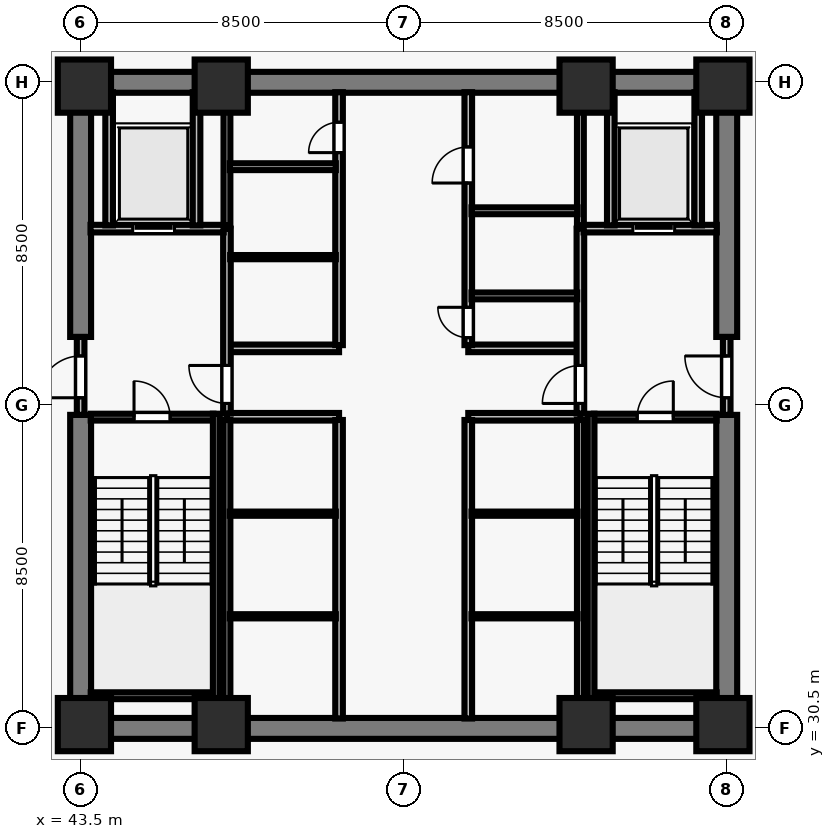
"""IFC4 building model, lengths in metres.
Left out: names, types, materials, properties, quantities, classifications, styles, units other than length and angle.
Written with IfcOpenShell. Run it as: python <this file> out.ifc"""

import sys

from ifc_helpers import new_model, si_unit, direction, frame, frame_2d, origin, origin_2d, place, context, subcontext, project, spatial, rectangle, extrude, element, fill, save


model = new_model("IFC4")
c1 = context("Model", 3, precision=1e-05, world=origin(), true_north=direction((0.0, 1.0)))
c2 = subcontext(c1, "Body", "Model", "MODEL_VIEW")
j1 = project(units=[si_unit("LENGTHUNIT", "METRE"), si_unit("PLANEANGLEUNIT", "RADIAN")], contexts=[c1])
p1 = place(None, origin())
s1 = spatial("IfcSite", under=j1, at=p1, CompositionType="ELEMENT")
p2 = place(p1, origin())
s2 = spatial("IfcBuilding", under=s1, at=p2, CompositionType="ELEMENT")
p3 = place(p2, frame((0.0, 0.0, -8.0)))
s3 = spatial("IfcBuildingStorey", under=s2, at=p3, CompositionType="ELEMENT", Elevation=-8.0)
for number, where, z_axis, x_axis in (
    (1, (43.6, 30.6, 0.0), (0.0, 0.0, 1.0), (1.0, 0.0, 0.0)),
    (2, (47.2, 30.6, 0.0), (0.0, 0.0, 1.0), (1.0, 0.0, 0.0)),
    (3, (56.8, 30.6, 0.0), (0.0, 0.0, 1.0), (1.0, 0.0, 0.0)),
    (4, (60.4, 30.6, 0.0), (0.0, 0.0, 1.0), (1.0, 0.0, 0.0)),
    (5, (43.6, 47.4, 0.0), (0.0, 0.0, 1.0), (1.0, 0.0, 0.0)),
    (6, (47.2, 47.4, 0.0), (0.0, 0.0, 1.0), (1.0, 0.0, 0.0)),
    (7, (56.8, 47.4, 0.0), (0.0, 0.0, 1.0), (1.0, 0.0, 0.0)),
    (8, (60.4, 47.4, 0.0), (0.0, 0.0, 1.0), (1.0, 0.0, 0.0)),
):
    element("IfcColumn", number, at=place(p3, frame(where, z_axis=z_axis, x_axis=x_axis)), inside=s3, PredefinedType="COLUMN", context=c2, shape_type="SweptSolid", body=[
        extrude(rectangle(XDim=1.4, YDim=1.4, at=origin_2d()), origin(), (0.0, 0.0, 1.0), 4.0),
    ])
for number, where, z_axis, x_axis in (
    (9, (43.225, 30.5, 0.0), (0.0, 0.0, 1.0), (1.0, 0.0, 0.0)),
    (10, (43.225, 47.5, 0.0), (0.0, 0.0, 1.0), (1.0, 0.0, 0.0)),
):
    element("IfcWall", number, at=place(p3, frame(where, z_axis=z_axis, x_axis=x_axis)), inside=s3, PredefinedType="SHEAR", context=c2, shape_type="SweptSolid", body=[
        extrude(rectangle(XDim=17.55, YDim=0.55, at=frame_2d((8.775, 0.0))), origin(), (0.0, 0.0, 1.0), 3.72),
    ])
p4 = place(p3, frame((43.5, 30.765, 0.0), z_axis=(0.0, 0.0, 1.0), x_axis=(0.0, 1.0, 0.0)))
e11 = element("IfcWall", 11, at=p4, inside=s3, PredefinedType="SHEAR", context=c2, shape_type="SweptSolid", body=[
    extrude(rectangle(XDim=7.985, YDim=0.55, at=frame_2d((3.993, 0.0))), origin(), (0.0, 0.0, 1.0), 3.72),
])
p5 = place(p3, frame((43.5, 40.8, 0.0), z_axis=(0.0, 0.0, 1.0), x_axis=(0.0, 1.0, 0.0)))
e12 = element("IfcWall", 12, at=p5, inside=s3, PredefinedType="SHEAR", context=c2, shape_type="SweptSolid", body=[
    extrude(rectangle(XDim=6.435, YDim=0.55, at=frame_2d((3.218, 0.0))), origin(), (0.0, 0.0, 1.0), 3.72),
])
p6 = place(p3, frame((60.5, 30.765, 0.0), z_axis=(0.0, 0.0, 1.0), x_axis=(0.0, 1.0, 0.0)))
e13 = element("IfcWall", 13, at=p6, inside=s3, PredefinedType="SHEAR", context=c2, shape_type="SweptSolid", body=[
    extrude(rectangle(XDim=7.985, YDim=0.55, at=frame_2d((3.993, 0.0))), origin(), (0.0, 0.0, 1.0), 3.72),
])
p7 = place(p3, frame((60.5, 40.8, 0.0), z_axis=(0.0, 0.0, 1.0), x_axis=(0.0, 1.0, 0.0)))
e14 = element("IfcWall", 14, at=p7, inside=s3, PredefinedType="SHEAR", context=c2, shape_type="SweptSolid", body=[
    extrude(rectangle(XDim=6.435, YDim=0.55, at=frame_2d((3.218, 0.0))), origin(), (0.0, 0.0, 1.0), 3.72),
])
for number, where, z_axis, x_axis in (
    (15, (47.35, 38.7, 0.0), (0.0, 0.0, 1.0), (1.0, 0.0, 0.0)),
    (16, (47.35, 40.5, 0.0), (0.0, 0.0, 1.0), (1.0, 0.0, 0.0)),
    (17, (53.7, 38.7, 0.0), (0.0, 0.0, 1.0), (1.0, 0.0, 0.0)),
    (18, (53.7, 40.5, 0.0), (0.0, 0.0, 1.0), (1.0, 0.0, 0.0)),
):
    element("IfcWall", number, at=place(p3, frame(where, z_axis=z_axis, x_axis=x_axis)), inside=s3, PredefinedType="SOLIDWALL", context=c2, shape_type="SweptSolid", body=[
        extrude(rectangle(XDim=2.95, YDim=0.2, at=frame_2d((1.475, 0.0))), origin(), (0.0, 0.0, 1.0), 3.72),
    ])
for number, where, z_axis, x_axis in (
    (19, (50.3, 30.76, 0.0), (0.0, 0.0, 1.0), (0.0, 1.0, 0.0)),
    (20, (53.7, 30.76, 0.0), (0.0, 0.0, 1.0), (0.0, 1.0, 0.0)),
):
    element("IfcWall", number, at=place(p3, frame(where, z_axis=z_axis, x_axis=x_axis)), inside=s3, PredefinedType="SOLIDWALL", context=c2, shape_type="SweptSolid", body=[
        extrude(rectangle(XDim=7.855, YDim=0.2, at=frame_2d((3.927, 0.0))), origin(), (0.0, 0.0, 1.0), 3.72),
    ])
p8 = place(p3, frame((50.3, 40.585, 0.0), z_axis=(0.0, 0.0, 1.0), x_axis=(0.0, 1.0, 0.0)))
e21 = element("IfcWall", 21, at=p8, inside=s3, PredefinedType="SOLIDWALL", context=c2, shape_type="SweptSolid", body=[
    extrude(rectangle(XDim=6.655, YDim=0.2, at=frame_2d((3.328, 0.0))), origin(), (0.0, 0.0, 1.0), 3.72),
])
p9 = place(p8, frame((5.065, 0.0, 0.0)))
e22 = element("IfcOpeningElement", 22, at=p9, cuts=e21, PredefinedType="OPENING", context=c2, shape_type="SweptSolid", body=[
    extrude(rectangle(XDim=0.8, YDim=2.08, at=frame_2d((0.4, 1.04))), frame((0.0, 0.11, 0.0), z_axis=(0.0, -1.0, 0.0), x_axis=(1.0, 0.0, 0.0)), (0.0, 0.0, 1.0), 0.22),
])
p10 = place(p3, frame((53.7, 40.585, 0.0), z_axis=(0.0, 0.0, 1.0), x_axis=(0.0, 1.0, 0.0)))
e23 = element("IfcWall", 23, at=p10, inside=s3, PredefinedType="SOLIDWALL", context=c2, shape_type="SweptSolid", body=[
    extrude(rectangle(XDim=6.655, YDim=0.2, at=frame_2d((3.328, 0.0))), origin(), (0.0, 0.0, 1.0), 3.72),
])
p11 = place(p10, frame((0.195, 0.0, 0.0)))
e24 = element("IfcOpeningElement", 24, at=p11, cuts=e23, PredefinedType="OPENING", context=c2, shape_type="SweptSolid", body=[
    extrude(rectangle(XDim=0.8, YDim=2.08, at=frame_2d((0.4, 1.04))), frame((0.0, 0.11, 0.0), z_axis=(0.0, -1.0, 0.0), x_axis=(1.0, 0.0, 0.0)), (0.0, 0.0, 1.0), 0.22),
])
p12 = place(p10, frame((4.265, 0.0, 0.0)))
e25 = element("IfcOpeningElement", 25, at=p12, cuts=e23, PredefinedType="OPENING", context=c2, shape_type="SweptSolid", body=[
    extrude(rectangle(XDim=0.95, YDim=2.12, at=frame_2d((0.475, 1.06))), frame((0.0, 0.11, 0.0), z_axis=(0.0, -1.0, 0.0), x_axis=(1.0, 0.0, 0.0)), (0.0, 0.0, 1.0), 0.22),
])
p13 = place(p3, frame((43.5, 38.75, 0.0), z_axis=(0.0, 0.0, 1.0), x_axis=(0.0, 1.0, 0.0)))
e26 = element("IfcWall", 26, at=p13, inside=s3, PredefinedType="SOLIDWALL", context=c2, shape_type="SweptSolid", body=[
    extrude(rectangle(XDim=2.05, YDim=0.2, at=frame_2d((1.025, 0.0))), origin(), (0.0, 0.0, 1.0), 3.72),
])
p14 = place(p13, frame((0.45, 0.0, 0.0)))
e27 = element("IfcOpeningElement", 27, at=p14, cuts=e26, PredefinedType="OPENING", context=c2, shape_type="SweptSolid", body=[
    extrude(rectangle(XDim=1.1, YDim=2.15, at=frame_2d((0.55, 1.075))), frame((0.0, 0.11, 0.0), z_axis=(0.0, -1.0, 0.0), x_axis=(1.0, 0.0, 0.0)), (0.0, 0.0, 1.0), 0.22),
])
p15 = place(p3, frame((47.35, 38.785, 0.0), z_axis=(0.0, 0.0, 1.0), x_axis=(0.0, 1.0, 0.0)))
e28 = element("IfcWall", 28, at=p15, inside=s3, PredefinedType="SOLIDWALL", context=c2, shape_type="SweptSolid", body=[
    extrude(rectangle(XDim=4.865, YDim=0.2, at=frame_2d((2.433, 0.0))), origin(), (0.0, 0.0, 1.0), 3.72),
])
p16 = place(p15, frame((0.265, 0.0, 0.0)))
e29 = element("IfcOpeningElement", 29, at=p16, cuts=e28, PredefinedType="OPENING", context=c2, shape_type="SweptSolid", body=[
    extrude(rectangle(XDim=1.0, YDim=2.15, at=frame_2d((0.5, 1.075))), frame((0.0, 0.11, 0.0), z_axis=(0.0, -1.0, 0.0), x_axis=(1.0, 0.0, 0.0)), (0.0, 0.0, 1.0), 0.22),
])
p17 = place(p3, frame((43.76, 43.65, 0.0), z_axis=(0.0, 0.0, 1.0), x_axis=(1.0, 0.0, 0.0)))
e30 = element("IfcWall", 30, at=p17, inside=s3, PredefinedType="SOLIDWALL", context=c2, shape_type="SweptSolid", body=[
    extrude(rectangle(XDim=3.505, YDim=0.2, at=frame_2d((1.752, 0.0))), origin(), (0.0, 0.0, 1.0), 3.72),
])
p18 = place(p17, frame((1.11, 0.0, 0.0)))
e31 = element("IfcOpeningElement", 31, at=p18, cuts=e30, PredefinedType="OPENING", context=c2, shape_type="SweptSolid", body=[
    extrude(rectangle(XDim=1.1, YDim=2.2, at=frame_2d((0.55, 1.1))), frame((0.0, 0.11, 0.0), z_axis=(0.0, -1.0, 0.0), x_axis=(1.0, 0.0, 0.0)), (0.0, 0.0, 1.0), 0.22),
])
for number, where, z_axis, x_axis in (
    (32, (46.55, 43.735, 0.0), (0.0, 0.0, 1.0), (0.0, 1.0, 0.0)),
    (33, (44.25, 43.735, 0.0), (0.0, 0.0, 1.0), (0.0, 1.0, 0.0)),
):
    element("IfcWall", number, at=place(p3, frame(where, z_axis=z_axis, x_axis=x_axis)), inside=s3, PredefinedType="SOLIDWALL", context=c2, shape_type="SweptSolid", body=[
        extrude(rectangle(XDim=3.505, YDim=0.2, at=frame_2d((1.752, 0.0))), origin(), (0.0, 0.0, 1.0), 3.72),
    ])
p19 = place(p3, frame((60.5, 38.75, 0.0), z_axis=(0.0, 0.0, 1.0), x_axis=(0.0, 1.0, 0.0)))
e34 = element("IfcWall", 34, at=p19, inside=s3, PredefinedType="SOLIDWALL", context=c2, shape_type="SweptSolid", body=[
    extrude(rectangle(XDim=2.05, YDim=0.2, at=frame_2d((1.025, 0.0))), origin(), (0.0, 0.0, 1.0), 3.72),
])
p20 = place(p19, frame((0.45, 0.0, 0.0)))
e35 = element("IfcOpeningElement", 35, at=p20, cuts=e34, PredefinedType="OPENING", context=c2, shape_type="SweptSolid", body=[
    extrude(rectangle(XDim=1.1, YDim=2.15, at=frame_2d((0.55, 1.075))), frame((0.0, 0.11, 0.0), z_axis=(0.0, -1.0, 0.0), x_axis=(1.0, 0.0, 0.0)), (0.0, 0.0, 1.0), 0.22),
])
p21 = place(p3, frame((56.65, 38.785, 0.0), z_axis=(0.0, 0.0, 1.0), x_axis=(0.0, 1.0, 0.0)))
e36 = element("IfcWall", 36, at=p21, inside=s3, PredefinedType="SOLIDWALL", context=c2, shape_type="SweptSolid", body=[
    extrude(rectangle(XDim=4.865, YDim=0.2, at=frame_2d((2.433, 0.0))), origin(), (0.0, 0.0, 1.0), 3.72),
])
p22 = place(p21, frame((0.265, 0.0, 0.0)))
e37 = element("IfcOpeningElement", 37, at=p22, cuts=e36, PredefinedType="OPENING", context=c2, shape_type="SweptSolid", body=[
    extrude(rectangle(XDim=1.0, YDim=2.15, at=frame_2d((0.5, 1.075))), frame((0.0, 0.11, 0.0), z_axis=(0.0, -1.0, 0.0), x_axis=(1.0, 0.0, 0.0)), (0.0, 0.0, 1.0), 0.22),
])
p23 = place(p3, frame((56.735, 43.65, 0.0), z_axis=(0.0, 0.0, 1.0), x_axis=(1.0, 0.0, 0.0)))
e38 = element("IfcWall", 38, at=p23, inside=s3, PredefinedType="SOLIDWALL", context=c2, shape_type="SweptSolid", body=[
    extrude(rectangle(XDim=3.505, YDim=0.2, at=frame_2d((1.752, 0.0))), origin(), (0.0, 0.0, 1.0), 3.72),
])
p24 = place(p23, frame((1.295, 0.0, 0.0)))
e39 = element("IfcOpeningElement", 39, at=p24, cuts=e38, PredefinedType="OPENING", context=c2, shape_type="SweptSolid", body=[
    extrude(rectangle(XDim=1.1, YDim=2.2, at=frame_2d((0.55, 1.1))), frame((0.0, 0.11, 0.0), z_axis=(0.0, -1.0, 0.0), x_axis=(1.0, 0.0, 0.0)), (0.0, 0.0, 1.0), 0.22),
])
for number, where, z_axis, x_axis in (
    (40, (57.45, 43.735, 0.0), (0.0, 0.0, 1.0), (0.0, 1.0, 0.0)),
    (41, (59.75, 43.735, 0.0), (0.0, 0.0, 1.0), (0.0, 1.0, 0.0)),
):
    element("IfcWall", number, at=place(p3, frame(where, z_axis=z_axis, x_axis=x_axis)), inside=s3, PredefinedType="SOLIDWALL", context=c2, shape_type="SweptSolid", body=[
        extrude(rectangle(XDim=3.505, YDim=0.2, at=frame_2d((1.752, 0.0))), origin(), (0.0, 0.0, 1.0), 3.72),
    ])
p25 = place(p3, frame((47.35, 30.76, 0.0), z_axis=(0.0, 0.0, 1.0), x_axis=(0.0, 1.0, 0.0)))
e42 = element("IfcWall", 42, at=p25, inside=s3, PredefinedType="SOLIDWALL", context=c2, shape_type="SweptSolid", body=[
    extrude(rectangle(XDim=7.855, YDim=0.18, at=frame_2d((3.927, 0.0))), origin(), (0.0, 0.0, 1.0), 3.72),
])
for number, where, z_axis, x_axis in (
    (43, (47.425, 33.45, 0.0), (0.0, 0.0, 1.0), (1.0, 0.0, 0.0)),
    (44, (47.425, 36.15, 0.0), (0.0, 0.0, 1.0), (1.0, 0.0, 0.0)),
):
    element("IfcWall", number, at=place(p3, frame(where, z_axis=z_axis, x_axis=x_axis)), inside=s3, PredefinedType="PARTITIONING", context=c2, shape_type="SweptSolid", body=[
        extrude(rectangle(XDim=2.79, YDim=0.11, at=frame_2d((1.395, 0.0))), origin(), (0.0, 0.0, 1.0), 3.72),
    ])
p26 = place(p3, frame((56.65, 30.76, 0.0), z_axis=(0.0, 0.0, 1.0), x_axis=(0.0, 1.0, 0.0)))
e45 = element("IfcWall", 45, at=p26, inside=s3, PredefinedType="SOLIDWALL", context=c2, shape_type="SweptSolid", body=[
    extrude(rectangle(XDim=7.855, YDim=0.18, at=frame_2d((3.927, 0.0))), origin(), (0.0, 0.0, 1.0), 3.72),
])
for number, where, z_axis, x_axis in (
    (46, (53.785, 33.45, 0.0), (0.0, 0.0, 1.0), (1.0, 0.0, 0.0)),
    (47, (53.785, 36.15, 0.0), (0.0, 0.0, 1.0), (1.0, 0.0, 0.0)),
):
    element("IfcWall", number, at=place(p3, frame(where, z_axis=z_axis, x_axis=x_axis)), inside=s3, PredefinedType="PARTITIONING", context=c2, shape_type="SweptSolid", body=[
        extrude(rectangle(XDim=2.79, YDim=0.11, at=frame_2d((1.395, 0.0))), origin(), (0.0, 0.0, 1.0), 3.72),
    ])
p27 = place(p3, frame((47.35, 43.735, 0.0), z_axis=(0.0, 0.0, 1.0), x_axis=(0.0, 1.0, 0.0)))
e48 = element("IfcWall", 48, at=p27, inside=s3, PredefinedType="SOLIDWALL", context=c2, shape_type="SweptSolid", body=[
    extrude(rectangle(XDim=3.505, YDim=0.18, at=frame_2d((1.752, 0.0))), origin(), (0.0, 0.0, 1.0), 3.72),
])
p28 = place(p3, frame((47.435, 42.9, 0.0), z_axis=(0.0, 0.0, 1.0), x_axis=(1.0, 0.0, 0.0)))
e49 = element("IfcWall", 49, at=p28, inside=s3, PredefinedType="PARTITIONING", context=c2, shape_type="SweptSolid", body=[
    extrude(rectangle(XDim=2.78, YDim=0.11, at=frame_2d((1.39, 0.0))), origin(), (0.0, 0.0, 1.0), 3.72),
])
p29 = place(p3, frame((47.425, 45.28, 0.0), z_axis=(0.0, 0.0, 1.0), x_axis=(1.0, 0.0, 0.0)))
e50 = element("IfcWall", 50, at=p29, inside=s3, PredefinedType="SOLIDWALL", context=c2, shape_type="SweptSolid", body=[
    extrude(rectangle(XDim=2.79, YDim=0.18, at=frame_2d((1.395, 0.0))), origin(), (0.0, 0.0, 1.0), 3.72),
])
p30 = place(p3, frame((56.65, 43.735, 0.0), z_axis=(0.0, 0.0, 1.0), x_axis=(0.0, 1.0, 0.0)))
e51 = element("IfcWall", 51, at=p30, inside=s3, PredefinedType="SOLIDWALL", context=c2, shape_type="SweptSolid", body=[
    extrude(rectangle(XDim=3.505, YDim=0.18, at=frame_2d((1.752, 0.0))), origin(), (0.0, 0.0, 1.0), 3.72),
])
p31 = place(p3, frame((53.785, 41.88, 0.0), z_axis=(0.0, 0.0, 1.0), x_axis=(1.0, 0.0, 0.0)))
e52 = element("IfcWall", 52, at=p31, inside=s3, PredefinedType="SOLIDWALL", context=c2, shape_type="SweptSolid", body=[
    extrude(rectangle(XDim=2.78, YDim=0.18, at=frame_2d((1.39, 0.0))), origin(), (0.0, 0.0, 1.0), 3.72),
])
p32 = place(p3, frame((53.785, 44.12, 0.0), z_axis=(0.0, 0.0, 1.0), x_axis=(1.0, 0.0, 0.0)))
e53 = element("IfcWall", 53, at=p32, inside=s3, PredefinedType="SOLIDWALL", context=c2, shape_type="SweptSolid", body=[
    extrude(rectangle(XDim=2.79, YDim=0.18, at=frame_2d((1.395, 0.0))), origin(), (0.0, 0.0, 1.0), 3.72),
])
p33 = place(p3, frame((43.765, 38.69, 0.0), z_axis=(0.0, 0.0, 1.0), x_axis=(1.0, 0.0, 0.0)))
e54 = element("IfcWall", 54, at=p33, inside=s3, PredefinedType="SOLIDWALL", context=c2, shape_type="SweptSolid", body=[
    extrude(rectangle(XDim=3.23, YDim=0.18, at=frame_2d((1.615, 0.0))), origin(), (0.0, 0.0, 1.0), 3.72),
])
p34 = place(p33, frame((1.14, 0.0, 0.0)))
e55 = element("IfcOpeningElement", 55, at=p34, cuts=e54, PredefinedType="OPENING", context=c2, shape_type="SweptSolid", body=[
    extrude(rectangle(XDim=0.95, YDim=2.15, at=frame_2d((0.475, 1.075))), frame((0.0, 0.1, 0.0), z_axis=(0.0, -1.0, 0.0), x_axis=(1.0, 0.0, 0.0)), (0.0, 0.0, 1.0), 0.2),
])
p35 = place(p3, frame((43.765, 31.36, 0.0), z_axis=(0.0, 0.0, 1.0), x_axis=(1.0, 0.0, 0.0)))
e56 = element("IfcWall", 56, at=p35, inside=s3, PredefinedType="SOLIDWALL", context=c2, shape_type="SweptSolid", body=[
    extrude(rectangle(XDim=3.23, YDim=0.18, at=frame_2d((1.615, 0.0))), origin(), (0.0, 0.0, 1.0), 3.72),
])
p36 = place(p3, frame((47.07, 38.78, 0.0), z_axis=(0.0, 0.0, 1.0), x_axis=(0.0, -1.0, 0.0)))
e57 = element("IfcWall", 57, at=p36, inside=s3, PredefinedType="SOLIDWALL", context=c2, shape_type="SweptSolid", body=[
    extrude(rectangle(XDim=8.017, YDim=0.18, at=frame_2d((4.009, 0.0))), origin(), (0.0, 0.0, 1.0), 3.72),
])
p37 = place(p3, frame((57.005, 38.69, 0.0), z_axis=(0.0, 0.0, 1.0), x_axis=(1.0, 0.0, 0.0)))
e58 = element("IfcWall", 58, at=p37, inside=s3, PredefinedType="SOLIDWALL", context=c2, shape_type="SweptSolid", body=[
    extrude(rectangle(XDim=3.23, YDim=0.18, at=frame_2d((1.615, 0.0))), origin(), (0.0, 0.0, 1.0), 3.72),
])
p38 = place(p37, frame((1.14, 0.0, 0.0)))
e59 = element("IfcOpeningElement", 59, at=p38, cuts=e58, PredefinedType="OPENING", context=c2, shape_type="SweptSolid", body=[
    extrude(rectangle(XDim=0.95, YDim=2.15, at=frame_2d((0.475, 1.075))), frame((0.0, 0.1, 0.0), z_axis=(0.0, -1.0, 0.0), x_axis=(1.0, 0.0, 0.0)), (0.0, 0.0, 1.0), 0.2),
])
p39 = place(p3, frame((57.005, 31.36, 0.0), z_axis=(0.0, 0.0, 1.0), x_axis=(1.0, 0.0, 0.0)))
e60 = element("IfcWall", 60, at=p39, inside=s3, PredefinedType="SOLIDWALL", context=c2, shape_type="SweptSolid", body=[
    extrude(rectangle(XDim=3.23, YDim=0.18, at=frame_2d((1.615, 0.0))), origin(), (0.0, 0.0, 1.0), 3.72),
])
p40 = place(p3, frame((56.93, 38.78, 0.0), z_axis=(0.0, 0.0, 1.0), x_axis=(0.0, -1.0, 0.0)))
e61 = element("IfcWall", 61, at=p40, inside=s3, PredefinedType="SOLIDWALL", context=c2, shape_type="SweptSolid", body=[
    extrude(rectangle(XDim=8.017, YDim=0.18, at=frame_2d((4.009, 0.0))), origin(), (0.0, 0.0, 1.0), 3.72),
])
p41 = place(p14, origin())
e62 = element("IfcDoor", 62, at=p41, inside=s3, OperationType="SINGLE_SWING_LEFT", PredefinedType="DOOR", context=c2, shape_type="SweptSolid", body=[
    extrude(rectangle(XDim=1.1, YDim=2.15, at=frame_2d((0.55, 1.075))), frame((0.0, 0.025, 0.0), z_axis=(0.0, -1.0, 0.0), x_axis=(1.0, 0.0, 0.0)), (0.0, 0.0, 1.0), 0.05),
])
fill(e27, e62)
p42 = place(p16, origin())
e63 = element("IfcDoor", 63, at=p42, inside=s3, OperationType="SINGLE_SWING_RIGHT", PredefinedType="DOOR", context=c2, shape_type="SweptSolid", body=[
    extrude(rectangle(XDim=1.0, YDim=2.15, at=frame_2d((0.5, 1.075))), frame((0.0, 0.025, 0.0), z_axis=(0.0, -1.0, 0.0), x_axis=(1.0, 0.0, 0.0)), (0.0, 0.0, 1.0), 0.05),
])
fill(e29, e63)
p43 = place(p18, origin())
e64 = element("IfcDoor", 64, at=p43, inside=s3, OperationType="SLIDING_TO_LEFT", PredefinedType="DOOR", context=c2, shape_type="SweptSolid", body=[
    extrude(rectangle(XDim=1.1, YDim=2.2, at=frame_2d((0.55, 1.1))), frame((0.0, 0.025, 0.0), z_axis=(0.0, -1.0, 0.0), x_axis=(1.0, 0.0, 0.0)), (0.0, 0.0, 1.0), 0.05),
])
fill(e31, e64)
p44 = place(p20, origin())
e65 = element("IfcDoor", 65, at=p44, inside=s3, OperationType="SINGLE_SWING_RIGHT", PredefinedType="DOOR", context=c2, shape_type="SweptSolid", body=[
    extrude(rectangle(XDim=1.1, YDim=2.15, at=frame_2d((0.55, 1.075))), frame((0.0, 0.025, 0.0), z_axis=(0.0, -1.0, 0.0), x_axis=(1.0, 0.0, 0.0)), (0.0, 0.0, 1.0), 0.05),
])
fill(e35, e65)
p45 = place(p22, origin())
e66 = element("IfcDoor", 66, at=p45, inside=s3, OperationType="SINGLE_SWING_LEFT", PredefinedType="DOOR", context=c2, shape_type="SweptSolid", body=[
    extrude(rectangle(XDim=1.0, YDim=2.15, at=frame_2d((0.5, 1.075))), frame((0.0, 0.025, 0.0), z_axis=(0.0, -1.0, 0.0), x_axis=(1.0, 0.0, 0.0)), (0.0, 0.0, 1.0), 0.05),
])
fill(e37, e66)
p46 = place(p24, origin())
e67 = element("IfcDoor", 67, at=p46, inside=s3, OperationType="SLIDING_TO_LEFT", PredefinedType="DOOR", context=c2, shape_type="SweptSolid", body=[
    extrude(rectangle(XDim=1.1, YDim=2.2, at=frame_2d((0.55, 1.1))), frame((0.0, 0.025, 0.0), z_axis=(0.0, -1.0, 0.0), x_axis=(1.0, 0.0, 0.0)), (0.0, 0.0, 1.0), 0.05),
])
fill(e39, e67)
p47 = place(p9, origin())
e68 = element("IfcDoor", 68, at=p47, inside=s3, OperationType="SINGLE_SWING_LEFT", PredefinedType="DOOR", context=c2, shape_type="SweptSolid", body=[
    extrude(rectangle(XDim=0.8, YDim=2.08, at=frame_2d((0.4, 1.04))), frame((0.0, 0.025, 0.0), z_axis=(0.0, -1.0, 0.0), x_axis=(1.0, 0.0, 0.0)), (0.0, 0.0, 1.0), 0.05),
])
fill(e22, e68)
p48 = place(p11, origin())
e69 = element("IfcDoor", 69, at=p48, inside=s3, OperationType="SINGLE_SWING_RIGHT", PredefinedType="DOOR", context=c2, shape_type="SweptSolid", body=[
    extrude(rectangle(XDim=0.8, YDim=2.08, at=frame_2d((0.4, 1.04))), frame((0.0, 0.025, 0.0), z_axis=(0.0, -1.0, 0.0), x_axis=(1.0, 0.0, 0.0)), (0.0, 0.0, 1.0), 0.05),
])
fill(e24, e69)
p49 = place(p12, origin())
e70 = element("IfcDoor", 70, at=p49, inside=s3, OperationType="SINGLE_SWING_LEFT", PredefinedType="DOOR", context=c2, shape_type="SweptSolid", body=[
    extrude(rectangle(XDim=0.95, YDim=2.12, at=frame_2d((0.475, 1.06))), frame((0.0, 0.025, 0.0), z_axis=(0.0, -1.0, 0.0), x_axis=(1.0, 0.0, 0.0)), (0.0, 0.0, 1.0), 0.05),
])
fill(e25, e70)
p50 = place(p34, origin())
e71 = element("IfcDoor", 71, at=p50, inside=s3, OperationType="SINGLE_SWING_LEFT", PredefinedType="DOOR", context=c2, shape_type="SweptSolid", body=[
    extrude(rectangle(XDim=0.95, YDim=2.15, at=frame_2d((0.475, 1.075))), frame((0.0, 0.025, 0.0), z_axis=(0.0, -1.0, 0.0), x_axis=(1.0, 0.0, 0.0)), (0.0, 0.0, 1.0), 0.05),
])
fill(e55, e71)
p51 = place(p38, origin())
e72 = element("IfcDoor", 72, at=p51, inside=s3, OperationType="SINGLE_SWING_RIGHT", PredefinedType="DOOR", context=c2, shape_type="SweptSolid", body=[
    extrude(rectangle(XDim=0.95, YDim=2.15, at=frame_2d((0.475, 1.075))), frame((0.0, 0.025, 0.0), z_axis=(0.0, -1.0, 0.0), x_axis=(1.0, 0.0, 0.0)), (0.0, 0.0, 1.0), 0.05),
])
fill(e59, e72)
save(model, sys.argv[1])
